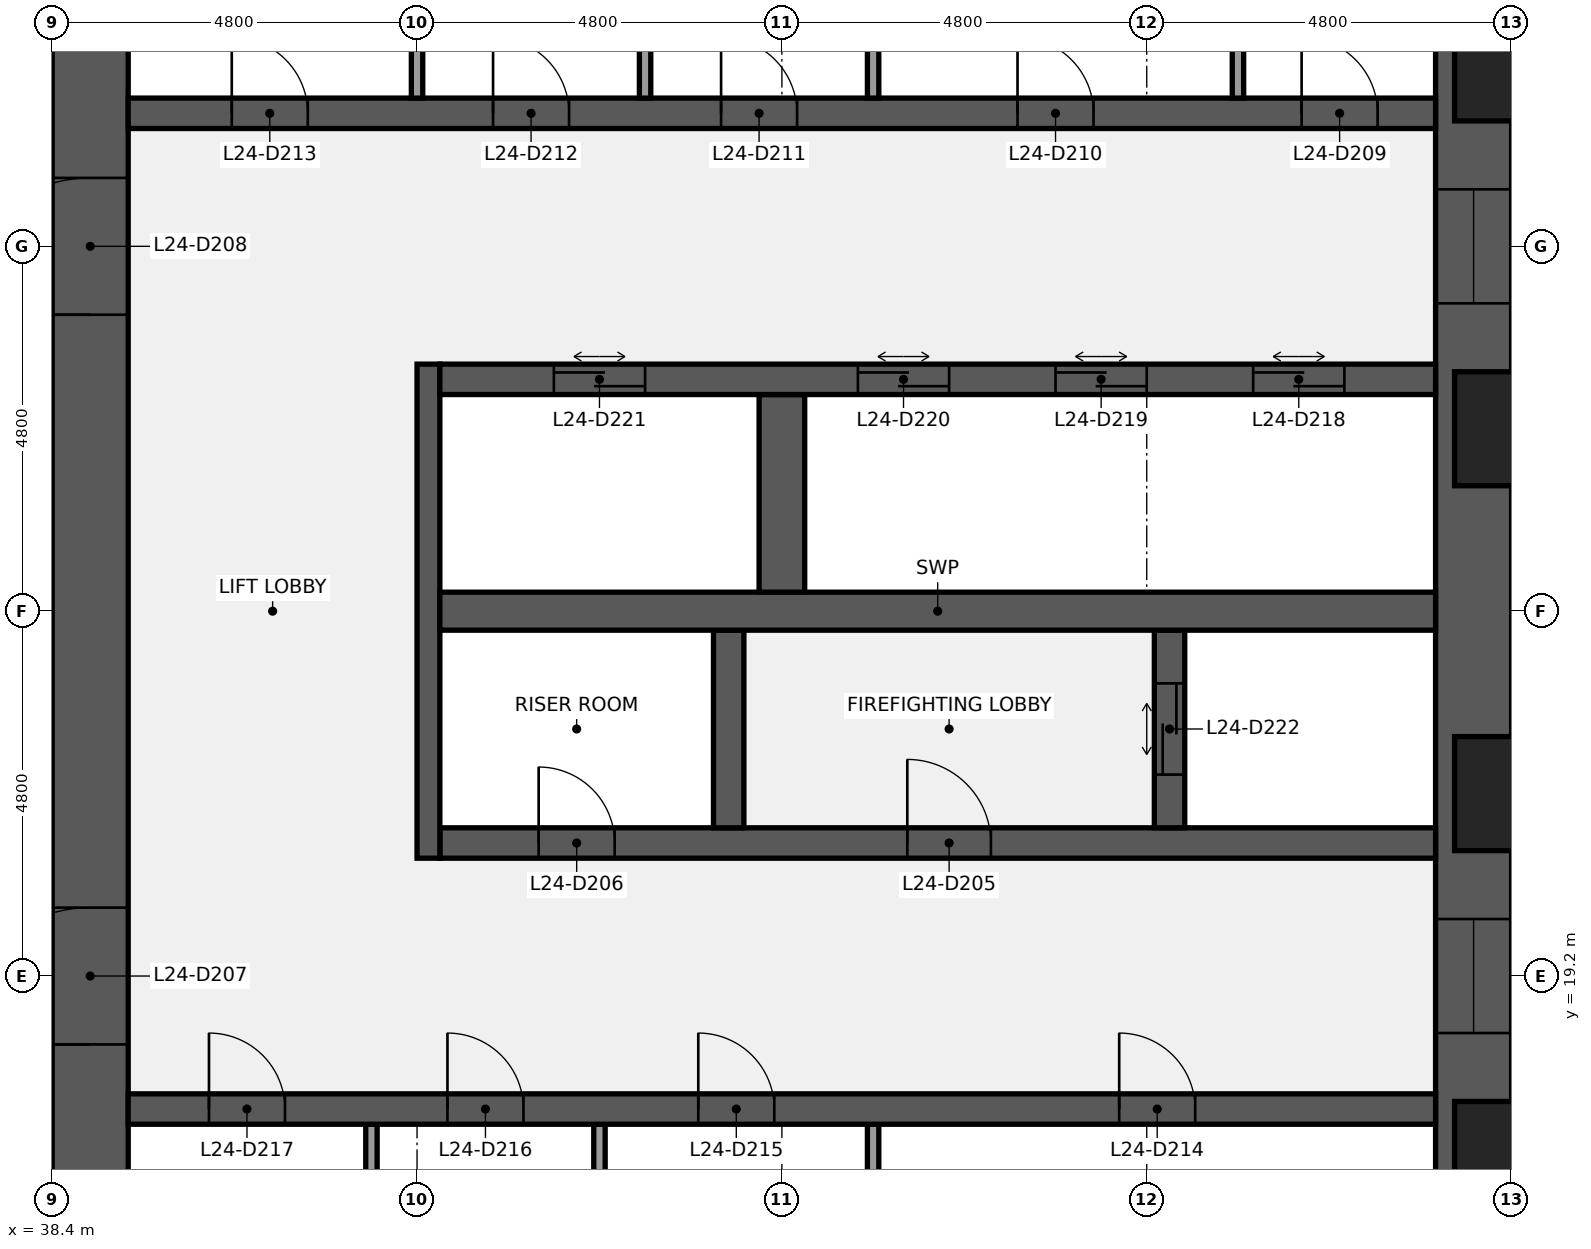
"""IFC4 building model, lengths in metres.
Left out: names, types, materials, properties, quantities, classifications, styles, units other than length and angle.
Written with IfcOpenShell. Run it as: python <this file> out.ifc"""

import sys

from ifc_helpers import new_model, si_unit, direction, frame, frame_2d, origin, place, context, subcontext, project, spatial, rectangle, extrude, element, fill, save


model = new_model("IFC4")
c1 = context("Model", 3, precision=1e-05, world=origin(), true_north=direction((0.0, 1.0)))
c2 = subcontext(c1, "Body", "Model", "MODEL_VIEW")
j1 = project(units=[si_unit("LENGTHUNIT", "METRE"), si_unit("PLANEANGLEUNIT", "RADIAN")], contexts=[c1])
p1 = place(None, origin())
s1 = spatial("IfcSite", under=j1, at=p1, CompositionType="ELEMENT")
p2 = place(p1, origin())
s2 = spatial("IfcBuilding", under=s1, at=p2, CompositionType="ELEMENT")
p3 = place(p2, frame((0.0, 0.0, 116.1)))
s3 = spatial("IfcBuildingStorey", under=s2, at=p3, CompositionType="ELEMENT", Elevation=116.1)
p4 = place(p3, frame((57.1, 38.4, 0.0), z_axis=(0.0, 0.0, 1.0), x_axis=(0.0, -1.0, 0.0)))
e1 = element("IfcWall", 1, at=p4, inside=s3, PredefinedType="SHEAR", context=c2, shape_type="SweptSolid", body=[
    extrude(rectangle(XDim=28.8, YDim=1.0, at=frame_2d((14.4, 0.0))), origin(), (0.0, 0.0, 1.0), 3.84),
])
p5 = place(p4, frame((18.45, 0.0, 0.9)))
e2 = element("IfcOpeningElement", 2, at=p5, cuts=e1, PredefinedType="OPENING", context=c2, shape_type="SweptSolid", body=[
    extrude(rectangle(XDim=1.5, YDim=1.5, at=frame_2d((0.75, 0.75))), frame((0.0, 0.51, 0.0), z_axis=(0.0, -1.0, 0.0), x_axis=(1.0, 0.0, 0.0)), (0.0, 0.0, 1.0), 1.02),
])
p6 = place(p4, frame((8.85, 0.0, 0.9)))
e3 = element("IfcOpeningElement", 3, at=p6, cuts=e1, PredefinedType="OPENING", context=c2, shape_type="SweptSolid", body=[
    extrude(rectangle(XDim=1.5, YDim=1.5, at=frame_2d((0.75, 0.75))), frame((0.0, 0.51, 0.0), z_axis=(0.0, -1.0, 0.0), x_axis=(1.0, 0.0, 0.0)), (0.0, 0.0, 1.0), 1.02),
])
p7 = place(p3, frame((38.9, 9.6, 0.0), z_axis=(0.0, 0.0, 1.0), x_axis=(0.0, 1.0, 0.0)))
e4 = element("IfcWall", 4, at=p7, inside=s3, PredefinedType="SHEAR", context=c2, shape_type="SweptSolid", body=[
    extrude(rectangle(XDim=28.8, YDim=1.0, at=frame_2d((14.4, 0.0))), origin(), (0.0, 0.0, 1.0), 3.84),
])
p8 = place(p7, frame((8.7, 0.0, 0.0)))
e5 = element("IfcOpeningElement", 5, at=p8, cuts=e4, PredefinedType="OPENING", context=c2, shape_type="SweptSolid", body=[
    extrude(rectangle(XDim=1.8, YDim=2.1, at=frame_2d((0.9, 1.05))), frame((0.0, 0.51, 0.0), z_axis=(0.0, -1.0, 0.0), x_axis=(1.0, 0.0, 0.0)), (0.0, 0.0, 1.0), 1.02),
])
p9 = place(p7, frame((18.3, 0.0, 0.0)))
e6 = element("IfcOpeningElement", 6, at=p9, cuts=e4, PredefinedType="OPENING", context=c2, shape_type="SweptSolid", body=[
    extrude(rectangle(XDim=1.8, YDim=2.1, at=frame_2d((0.9, 1.05))), frame((0.0, 0.51, 0.0), z_axis=(0.0, -1.0, 0.0), x_axis=(1.0, 0.0, 0.0)), (0.0, 0.0, 1.0), 1.02),
])
for number, where, z_axis, x_axis in (
    (7, (49.2, 14.65, 0.0), (0.0, 0.0, 1.0), (0.0, 1.0, 0.0)),
    (8, (45.6, 14.65, 0.0), (0.0, 0.0, 1.0), (0.0, 1.0, 0.0)),
    (9, (42.6, 14.65, 0.0), (0.0, 0.0, 1.0), (0.0, 1.0, 0.0)),
):
    element("IfcWall", number, at=place(p3, frame(where, z_axis=z_axis, x_axis=x_axis)), inside=s3, PredefinedType="PARTITIONING", context=c2, shape_type="SweptSolid", body=[
        extrude(rectangle(XDim=2.6, YDim=0.15, at=frame_2d((1.3, 0.0))), origin(), (0.0, 0.0, 1.0), 3.84),
    ])
p10 = place(p3, frame((39.4, 17.45, 0.0), z_axis=(0.0, 0.0, 1.0), x_axis=(1.0, 0.0, 0.0)))
e10 = element("IfcWall", 10, at=p10, inside=s3, PredefinedType="SHEAR", context=c2, shape_type="SweptSolid", body=[
    extrude(rectangle(XDim=17.2, YDim=0.4, at=frame_2d((8.6, 0.0))), origin(), (0.0, 0.0, 1.0), 3.84),
])
p11 = place(p10, frame((13.038, 0.0, 0.0)))
e11 = element("IfcOpeningElement", 11, at=p11, cuts=e10, PredefinedType="OPENING", context=c2, shape_type="SweptSolid", body=[
    extrude(rectangle(XDim=1.0, YDim=2.1, at=frame_2d((0.5, 1.05))), frame((0.0, 0.21, 0.0), z_axis=(0.0, -1.0, 0.0), x_axis=(1.0, 0.0, 0.0)), (0.0, 0.0, 1.0), 0.42),
])
p12 = place(p10, frame((7.5, 0.0, 0.0)))
e12 = element("IfcOpeningElement", 12, at=p12, cuts=e10, PredefinedType="OPENING", context=c2, shape_type="SweptSolid", body=[
    extrude(rectangle(XDim=1.0, YDim=2.1, at=frame_2d((0.5, 1.05))), frame((0.0, 0.21, 0.0), z_axis=(0.0, -1.0, 0.0), x_axis=(1.0, 0.0, 0.0)), (0.0, 0.0, 1.0), 0.42),
])
p13 = place(p10, frame((4.2, 0.0, 0.0)))
e13 = element("IfcOpeningElement", 13, at=p13, cuts=e10, PredefinedType="OPENING", context=c2, shape_type="SweptSolid", body=[
    extrude(rectangle(XDim=1.0, YDim=2.1, at=frame_2d((0.5, 1.05))), frame((0.0, 0.21, 0.0), z_axis=(0.0, -1.0, 0.0), x_axis=(1.0, 0.0, 0.0)), (0.0, 0.0, 1.0), 0.42),
])
p14 = place(p10, frame((1.062, 0.0, 0.0)))
e14 = element("IfcOpeningElement", 14, at=p14, cuts=e10, PredefinedType="OPENING", context=c2, shape_type="SweptSolid", body=[
    extrude(rectangle(XDim=1.0, YDim=2.1, at=frame_2d((0.5, 1.05))), frame((0.0, 0.21, 0.0), z_axis=(0.0, -1.0, 0.0), x_axis=(1.0, 0.0, 0.0)), (0.0, 0.0, 1.0), 0.42),
])
p15 = place(p3, frame((43.5, 20.95, 0.0), z_axis=(0.0, 0.0, 1.0), x_axis=(1.0, 0.0, 0.0)))
e15 = element("IfcWall", 15, at=p15, inside=s3, PredefinedType="SHEAR", context=c2, shape_type="SweptSolid", body=[
    extrude(rectangle(XDim=13.1, YDim=0.4, at=frame_2d((6.55, 0.0))), origin(), (0.0, 0.0, 1.0), 3.84),
])
p16 = place(p15, frame((6.15, 0.0, 0.0)))
e16 = element("IfcOpeningElement", 16, at=p16, cuts=e15, PredefinedType="OPENING", context=c2, shape_type="SweptSolid", body=[
    extrude(rectangle(XDim=1.1, YDim=2.1, at=frame_2d((0.55, 1.05))), frame((0.0, 0.21, 0.0), z_axis=(0.0, -1.0, 0.0), x_axis=(1.0, 0.0, 0.0)), (0.0, 0.0, 1.0), 0.42),
])
p17 = place(p15, frame((1.3, 0.0, 0.0)))
e17 = element("IfcOpeningElement", 17, at=p17, cuts=e15, PredefinedType="OPENING", context=c2, shape_type="SweptSolid", body=[
    extrude(rectangle(XDim=1.0, YDim=2.1, at=frame_2d((0.5, 1.05))), frame((0.0, 0.21, 0.0), z_axis=(0.0, -1.0, 0.0), x_axis=(1.0, 0.0, 0.0)), (0.0, 0.0, 1.0), 0.42),
])
p18 = place(p3, frame((43.35, 20.75, 0.0), z_axis=(0.0, 0.0, 1.0), x_axis=(0.0, 1.0, 0.0)))
e18 = element("IfcWall", 18, at=p18, inside=s3, PredefinedType="SHEAR", context=c2, shape_type="SweptSolid", body=[
    extrude(rectangle(XDim=6.5, YDim=0.3, at=frame_2d((3.25, 0.0))), origin(), (0.0, 0.0, 1.0), 3.84),
])
p19 = place(p3, frame((53.1, 21.15, 0.0), z_axis=(0.0, 0.0, 1.0), x_axis=(0.0, 1.0, 0.0)))
e19 = element("IfcWall", 19, at=p19, inside=s3, PredefinedType="SHEAR", context=c2, shape_type="SweptSolid", body=[
    extrude(rectangle(XDim=2.6, YDim=0.4, at=frame_2d((1.3, 0.0))), origin(), (0.0, 0.0, 1.0), 3.84),
])
p20 = place(p19, frame((0.7, 0.0, 0.0)))
e20 = element("IfcOpeningElement", 20, at=p20, cuts=e19, PredefinedType="OPENING", context=c2, shape_type="SweptSolid", body=[
    extrude(rectangle(XDim=1.2, YDim=2.1, at=frame_2d((0.6, 1.05))), frame((0.0, 0.21, 0.0), z_axis=(0.0, -1.0, 0.0), x_axis=(1.0, 0.0, 0.0)), (0.0, 0.0, 1.0), 0.42),
])
p21 = place(p3, frame((47.3, 21.15, 0.0), z_axis=(0.0, 0.0, 1.0), x_axis=(0.0, 1.0, 0.0)))
e21 = element("IfcWall", 21, at=p21, inside=s3, PredefinedType="SHEAR", context=c2, shape_type="SweptSolid", body=[
    extrude(rectangle(XDim=2.6, YDim=0.4, at=frame_2d((1.3, 0.0))), origin(), (0.0, 0.0, 1.0), 3.84),
])
p22 = place(p3, frame((43.5, 24.0, 0.0), z_axis=(0.0, 0.0, 1.0), x_axis=(1.0, 0.0, 0.0)))
e22 = element("IfcWall", 22, at=p22, inside=s3, PredefinedType="SHEAR", context=c2, shape_type="SweptSolid", body=[
    extrude(rectangle(XDim=13.1, YDim=0.5, at=frame_2d((6.55, 0.0))), origin(), (0.0, 0.0, 1.0), 3.84),
])
p23 = place(p3, frame((48.0, 24.25, 0.0), z_axis=(0.0, 0.0, 1.0), x_axis=(0.0, 1.0, 0.0)))
e23 = element("IfcWall", 23, at=p23, inside=s3, PredefinedType="SHEAR", context=c2, shape_type="SweptSolid", body=[
    extrude(rectangle(XDim=2.6, YDim=0.6, at=frame_2d((1.3, 0.0))), origin(), (0.0, 0.0, 1.0), 3.84),
])
p24 = place(p3, frame((43.5, 27.05, 0.0), z_axis=(0.0, 0.0, 1.0), x_axis=(1.0, 0.0, 0.0)))
e24 = element("IfcWall", 24, at=p24, inside=s3, PredefinedType="SHEAR", context=c2, shape_type="SweptSolid", body=[
    extrude(rectangle(XDim=13.1, YDim=0.4, at=frame_2d((6.55, 0.0))), origin(), (0.0, 0.0, 1.0), 3.84),
])
p25 = place(p24, frame((10.7, 0.0, 0.0)))
e25 = element("IfcOpeningElement", 25, at=p25, cuts=e24, PredefinedType="OPENING", context=c2, shape_type="SweptSolid", body=[
    extrude(rectangle(XDim=1.2, YDim=2.1, at=frame_2d((0.6, 1.05))), frame((0.0, 0.21, 0.0), z_axis=(0.0, -1.0, 0.0), x_axis=(1.0, 0.0, 0.0)), (0.0, 0.0, 1.0), 0.42),
])
p26 = place(p24, frame((8.1, 0.0, 0.0)))
e26 = element("IfcOpeningElement", 26, at=p26, cuts=e24, PredefinedType="OPENING", context=c2, shape_type="SweptSolid", body=[
    extrude(rectangle(XDim=1.2, YDim=2.1, at=frame_2d((0.6, 1.05))), frame((0.0, 0.21, 0.0), z_axis=(0.0, -1.0, 0.0), x_axis=(1.0, 0.0, 0.0)), (0.0, 0.0, 1.0), 0.42),
])
p27 = place(p24, frame((5.5, 0.0, 0.0)))
e27 = element("IfcOpeningElement", 27, at=p27, cuts=e24, PredefinedType="OPENING", context=c2, shape_type="SweptSolid", body=[
    extrude(rectangle(XDim=1.2, YDim=2.1, at=frame_2d((0.6, 1.05))), frame((0.0, 0.21, 0.0), z_axis=(0.0, -1.0, 0.0), x_axis=(1.0, 0.0, 0.0)), (0.0, 0.0, 1.0), 0.42),
])
p28 = place(p24, frame((1.5, 0.0, 0.0)))
e28 = element("IfcOpeningElement", 28, at=p28, cuts=e24, PredefinedType="OPENING", context=c2, shape_type="SweptSolid", body=[
    extrude(rectangle(XDim=1.2, YDim=2.1, at=frame_2d((0.6, 1.05))), frame((0.0, 0.21, 0.0), z_axis=(0.0, -1.0, 0.0), x_axis=(1.0, 0.0, 0.0)), (0.0, 0.0, 1.0), 0.42),
])
p29 = place(p3, frame((39.4, 30.55, 0.0), z_axis=(0.0, 0.0, 1.0), x_axis=(1.0, 0.0, 0.0)))
e29 = element("IfcWall", 29, at=p29, inside=s3, PredefinedType="SHEAR", context=c2, shape_type="SweptSolid", body=[
    extrude(rectangle(XDim=17.2, YDim=0.4, at=frame_2d((8.6, 0.0))), origin(), (0.0, 0.0, 1.0), 3.84),
])
p30 = place(p29, frame((15.438, 0.0, 0.0)))
e30 = element("IfcOpeningElement", 30, at=p30, cuts=e29, PredefinedType="OPENING", context=c2, shape_type="SweptSolid", body=[
    extrude(rectangle(XDim=1.0, YDim=2.1, at=frame_2d((0.5, 1.05))), frame((0.0, 0.21, 0.0), z_axis=(0.0, -1.0, 0.0), x_axis=(1.0, 0.0, 0.0)), (0.0, 0.0, 1.0), 0.42),
])
p31 = place(p29, frame((11.7, 0.0, 0.0)))
e31 = element("IfcOpeningElement", 31, at=p31, cuts=e29, PredefinedType="OPENING", context=c2, shape_type="SweptSolid", body=[
    extrude(rectangle(XDim=1.0, YDim=2.1, at=frame_2d((0.5, 1.05))), frame((0.0, 0.21, 0.0), z_axis=(0.0, -1.0, 0.0), x_axis=(1.0, 0.0, 0.0)), (0.0, 0.0, 1.0), 0.42),
])
p32 = place(p29, frame((7.8, 0.0, 0.0)))
e32 = element("IfcOpeningElement", 32, at=p32, cuts=e29, PredefinedType="OPENING", context=c2, shape_type="SweptSolid", body=[
    extrude(rectangle(XDim=1.0, YDim=2.1, at=frame_2d((0.5, 1.05))), frame((0.0, 0.21, 0.0), z_axis=(0.0, -1.0, 0.0), x_axis=(1.0, 0.0, 0.0)), (0.0, 0.0, 1.0), 0.42),
])
p33 = place(p29, frame((4.8, 0.0, 0.0)))
e33 = element("IfcOpeningElement", 33, at=p33, cuts=e29, PredefinedType="OPENING", context=c2, shape_type="SweptSolid", body=[
    extrude(rectangle(XDim=1.0, YDim=2.1, at=frame_2d((0.5, 1.05))), frame((0.0, 0.21, 0.0), z_axis=(0.0, -1.0, 0.0), x_axis=(1.0, 0.0, 0.0)), (0.0, 0.0, 1.0), 0.42),
])
p34 = place(p29, frame((1.363, 0.0, 0.0)))
e34 = element("IfcOpeningElement", 34, at=p34, cuts=e29, PredefinedType="OPENING", context=c2, shape_type="SweptSolid", body=[
    extrude(rectangle(XDim=1.0, YDim=2.1, at=frame_2d((0.5, 1.05))), frame((0.0, 0.21, 0.0), z_axis=(0.0, -1.0, 0.0), x_axis=(1.0, 0.0, 0.0)), (0.0, 0.0, 1.0), 0.42),
])
for number, where, z_axis, x_axis in (
    (35, (54.0, 30.75, 0.0), (0.0, 0.0, 1.0), (0.0, 1.0, 0.0)),
    (36, (49.2, 30.75, 0.0), (0.0, 0.0, 1.0), (0.0, 1.0, 0.0)),
    (37, (46.2, 30.75, 0.0), (0.0, 0.0, 1.0), (0.0, 1.0, 0.0)),
    (38, (43.2, 30.75, 0.0), (0.0, 0.0, 1.0), (0.0, 1.0, 0.0)),
):
    element("IfcWall", number, at=place(p3, frame(where, z_axis=z_axis, x_axis=x_axis)), inside=s3, PredefinedType="PARTITIONING", context=c2, shape_type="SweptSolid", body=[
        extrude(rectangle(XDim=2.6, YDim=0.15, at=frame_2d((1.3, 0.0))), origin(), (0.0, 0.0, 1.0), 3.84),
    ])
p35 = place(p16, origin())
e39 = element("IfcDoor", 39, at=p35, inside=s3, OperationType="SINGLE_SWING_LEFT", PredefinedType="DOOR", context=c2, shape_type="SweptSolid", body=[
    extrude(rectangle(XDim=1.1, YDim=2.1, at=frame_2d((0.55, 1.05))), frame((0.0, 0.025, 0.0), z_axis=(0.0, -1.0, 0.0), x_axis=(1.0, 0.0, 0.0)), (0.0, 0.0, 1.0), 0.05),
])
fill(e16, e39)
p36 = place(p17, origin())
e40 = element("IfcDoor", 40, at=p36, inside=s3, OperationType="SINGLE_SWING_LEFT", PredefinedType="DOOR", context=c2, shape_type="SweptSolid", body=[
    extrude(rectangle(XDim=1.0, YDim=2.1, at=frame_2d((0.5, 1.05))), frame((0.0, 0.025, 0.0), z_axis=(0.0, -1.0, 0.0), x_axis=(1.0, 0.0, 0.0)), (0.0, 0.0, 1.0), 0.05),
])
fill(e17, e40)
p37 = place(p8, origin())
e41 = element("IfcDoor", 41, at=p37, inside=s3, OperationType="DOUBLE_DOOR_SINGLE_SWING", PredefinedType="DOOR", context=c2, shape_type="SweptSolid", body=[
    extrude(rectangle(XDim=1.8, YDim=2.1, at=frame_2d((0.9, 1.05))), frame((0.0, 0.025, 0.0), z_axis=(0.0, -1.0, 0.0), x_axis=(1.0, 0.0, 0.0)), (0.0, 0.0, 1.0), 0.05),
])
fill(e5, e41)
p38 = place(p9, origin())
e42 = element("IfcDoor", 42, at=p38, inside=s3, OperationType="DOUBLE_DOOR_SINGLE_SWING", PredefinedType="DOOR", context=c2, shape_type="SweptSolid", body=[
    extrude(rectangle(XDim=1.8, YDim=2.1, at=frame_2d((0.9, 1.05))), frame((0.0, 0.025, 0.0), z_axis=(0.0, -1.0, 0.0), x_axis=(1.0, 0.0, 0.0)), (0.0, 0.0, 1.0), 0.05),
])
fill(e6, e42)
p39 = place(p30, origin())
e43 = element("IfcDoor", 43, at=p39, inside=s3, OperationType="SINGLE_SWING_LEFT", PredefinedType="DOOR", context=c2, shape_type="SweptSolid", body=[
    extrude(rectangle(XDim=1.0, YDim=2.1, at=frame_2d((0.5, 1.05))), frame((0.0, 0.025, 0.0), z_axis=(0.0, -1.0, 0.0), x_axis=(1.0, 0.0, 0.0)), (0.0, 0.0, 1.0), 0.05),
])
fill(e30, e43)
p40 = place(p31, origin())
e44 = element("IfcDoor", 44, at=p40, inside=s3, OperationType="SINGLE_SWING_LEFT", PredefinedType="DOOR", context=c2, shape_type="SweptSolid", body=[
    extrude(rectangle(XDim=1.0, YDim=2.1, at=frame_2d((0.5, 1.05))), frame((0.0, 0.025, 0.0), z_axis=(0.0, -1.0, 0.0), x_axis=(1.0, 0.0, 0.0)), (0.0, 0.0, 1.0), 0.05),
])
fill(e31, e44)
p41 = place(p32, origin())
e45 = element("IfcDoor", 45, at=p41, inside=s3, OperationType="SINGLE_SWING_LEFT", PredefinedType="DOOR", context=c2, shape_type="SweptSolid", body=[
    extrude(rectangle(XDim=1.0, YDim=2.1, at=frame_2d((0.5, 1.05))), frame((0.0, 0.025, 0.0), z_axis=(0.0, -1.0, 0.0), x_axis=(1.0, 0.0, 0.0)), (0.0, 0.0, 1.0), 0.05),
])
fill(e32, e45)
p42 = place(p33, origin())
e46 = element("IfcDoor", 46, at=p42, inside=s3, OperationType="SINGLE_SWING_LEFT", PredefinedType="DOOR", context=c2, shape_type="SweptSolid", body=[
    extrude(rectangle(XDim=1.0, YDim=2.1, at=frame_2d((0.5, 1.05))), frame((0.0, 0.025, 0.0), z_axis=(0.0, -1.0, 0.0), x_axis=(1.0, 0.0, 0.0)), (0.0, 0.0, 1.0), 0.05),
])
fill(e33, e46)
p43 = place(p34, origin())
e47 = element("IfcDoor", 47, at=p43, inside=s3, OperationType="SINGLE_SWING_LEFT", PredefinedType="DOOR", context=c2, shape_type="SweptSolid", body=[
    extrude(rectangle(XDim=1.0, YDim=2.1, at=frame_2d((0.5, 1.05))), frame((0.0, 0.025, 0.0), z_axis=(0.0, -1.0, 0.0), x_axis=(1.0, 0.0, 0.0)), (0.0, 0.0, 1.0), 0.05),
])
fill(e34, e47)
p44 = place(p11, origin())
e48 = element("IfcDoor", 48, at=p44, inside=s3, OperationType="SINGLE_SWING_LEFT", PredefinedType="DOOR", context=c2, shape_type="SweptSolid", body=[
    extrude(rectangle(XDim=1.0, YDim=2.1, at=frame_2d((0.5, 1.05))), frame((0.0, 0.025, 0.0), z_axis=(0.0, -1.0, 0.0), x_axis=(1.0, 0.0, 0.0)), (0.0, 0.0, 1.0), 0.05),
])
fill(e11, e48)
p45 = place(p12, origin())
e49 = element("IfcDoor", 49, at=p45, inside=s3, OperationType="SINGLE_SWING_LEFT", PredefinedType="DOOR", context=c2, shape_type="SweptSolid", body=[
    extrude(rectangle(XDim=1.0, YDim=2.1, at=frame_2d((0.5, 1.05))), frame((0.0, 0.025, 0.0), z_axis=(0.0, -1.0, 0.0), x_axis=(1.0, 0.0, 0.0)), (0.0, 0.0, 1.0), 0.05),
])
fill(e12, e49)
p46 = place(p13, origin())
e50 = element("IfcDoor", 50, at=p46, inside=s3, OperationType="SINGLE_SWING_LEFT", PredefinedType="DOOR", context=c2, shape_type="SweptSolid", body=[
    extrude(rectangle(XDim=1.0, YDim=2.1, at=frame_2d((0.5, 1.05))), frame((0.0, 0.025, 0.0), z_axis=(0.0, -1.0, 0.0), x_axis=(1.0, 0.0, 0.0)), (0.0, 0.0, 1.0), 0.05),
])
fill(e13, e50)
p47 = place(p14, origin())
e51 = element("IfcDoor", 51, at=p47, inside=s3, OperationType="SINGLE_SWING_LEFT", PredefinedType="DOOR", context=c2, shape_type="SweptSolid", body=[
    extrude(rectangle(XDim=1.0, YDim=2.1, at=frame_2d((0.5, 1.05))), frame((0.0, 0.025, 0.0), z_axis=(0.0, -1.0, 0.0), x_axis=(1.0, 0.0, 0.0)), (0.0, 0.0, 1.0), 0.05),
])
fill(e14, e51)
p48 = place(p25, origin())
e52 = element("IfcDoor", 52, at=p48, inside=s3, OperationType="DOUBLE_DOOR_SLIDING", PredefinedType="DOOR", context=c2, shape_type="SweptSolid", body=[
    extrude(rectangle(XDim=1.2, YDim=2.1, at=frame_2d((0.6, 1.05))), frame((0.0, 0.025, 0.0), z_axis=(0.0, -1.0, 0.0), x_axis=(1.0, 0.0, 0.0)), (0.0, 0.0, 1.0), 0.05),
])
fill(e25, e52)
p49 = place(p26, origin())
e53 = element("IfcDoor", 53, at=p49, inside=s3, OperationType="DOUBLE_DOOR_SLIDING", PredefinedType="DOOR", context=c2, shape_type="SweptSolid", body=[
    extrude(rectangle(XDim=1.2, YDim=2.1, at=frame_2d((0.6, 1.05))), frame((0.0, 0.025, 0.0), z_axis=(0.0, -1.0, 0.0), x_axis=(1.0, 0.0, 0.0)), (0.0, 0.0, 1.0), 0.05),
])
fill(e26, e53)
p50 = place(p27, origin())
e54 = element("IfcDoor", 54, at=p50, inside=s3, OperationType="DOUBLE_DOOR_SLIDING", PredefinedType="DOOR", context=c2, shape_type="SweptSolid", body=[
    extrude(rectangle(XDim=1.2, YDim=2.1, at=frame_2d((0.6, 1.05))), frame((0.0, 0.025, 0.0), z_axis=(0.0, -1.0, 0.0), x_axis=(1.0, 0.0, 0.0)), (0.0, 0.0, 1.0), 0.05),
])
fill(e27, e54)
p51 = place(p28, origin())
e55 = element("IfcDoor", 55, at=p51, inside=s3, OperationType="DOUBLE_DOOR_SLIDING", PredefinedType="DOOR", context=c2, shape_type="SweptSolid", body=[
    extrude(rectangle(XDim=1.2, YDim=2.1, at=frame_2d((0.6, 1.05))), frame((0.0, 0.025, 0.0), z_axis=(0.0, -1.0, 0.0), x_axis=(1.0, 0.0, 0.0)), (0.0, 0.0, 1.0), 0.05),
])
fill(e28, e55)
p52 = place(p20, origin())
e56 = element("IfcDoor", 56, at=p52, inside=s3, OperationType="DOUBLE_DOOR_SLIDING", PredefinedType="DOOR", context=c2, shape_type="SweptSolid", body=[
    extrude(rectangle(XDim=1.2, YDim=2.1, at=frame_2d((0.6, 1.05))), frame((0.0, 0.025, 0.0), z_axis=(0.0, -1.0, 0.0), x_axis=(1.0, 0.0, 0.0)), (0.0, 0.0, 1.0), 0.05),
])
fill(e20, e56)
p53 = place(p5, origin())
e57 = element("IfcWindow", 57, at=p53, inside=s3, PartitioningType="SINGLE_PANEL", PredefinedType="WINDOW", context=c2, shape_type="SweptSolid", body=[
    extrude(rectangle(XDim=1.5, YDim=1.5, at=frame_2d((0.75, 0.75))), frame((0.0, 0.03, 0.0), z_axis=(0.0, -1.0, 0.0), x_axis=(1.0, 0.0, 0.0)), (0.0, 0.0, 1.0), 0.06),
])
fill(e2, e57)
p54 = place(p6, origin())
e58 = element("IfcWindow", 58, at=p54, inside=s3, PartitioningType="SINGLE_PANEL", PredefinedType="WINDOW", context=c2, shape_type="SweptSolid", body=[
    extrude(rectangle(XDim=1.5, YDim=1.5, at=frame_2d((0.75, 0.75))), frame((0.0, 0.03, 0.0), z_axis=(0.0, -1.0, 0.0), x_axis=(1.0, 0.0, 0.0)), (0.0, 0.0, 1.0), 0.06),
])
fill(e3, e58)
save(model, sys.argv[1])
